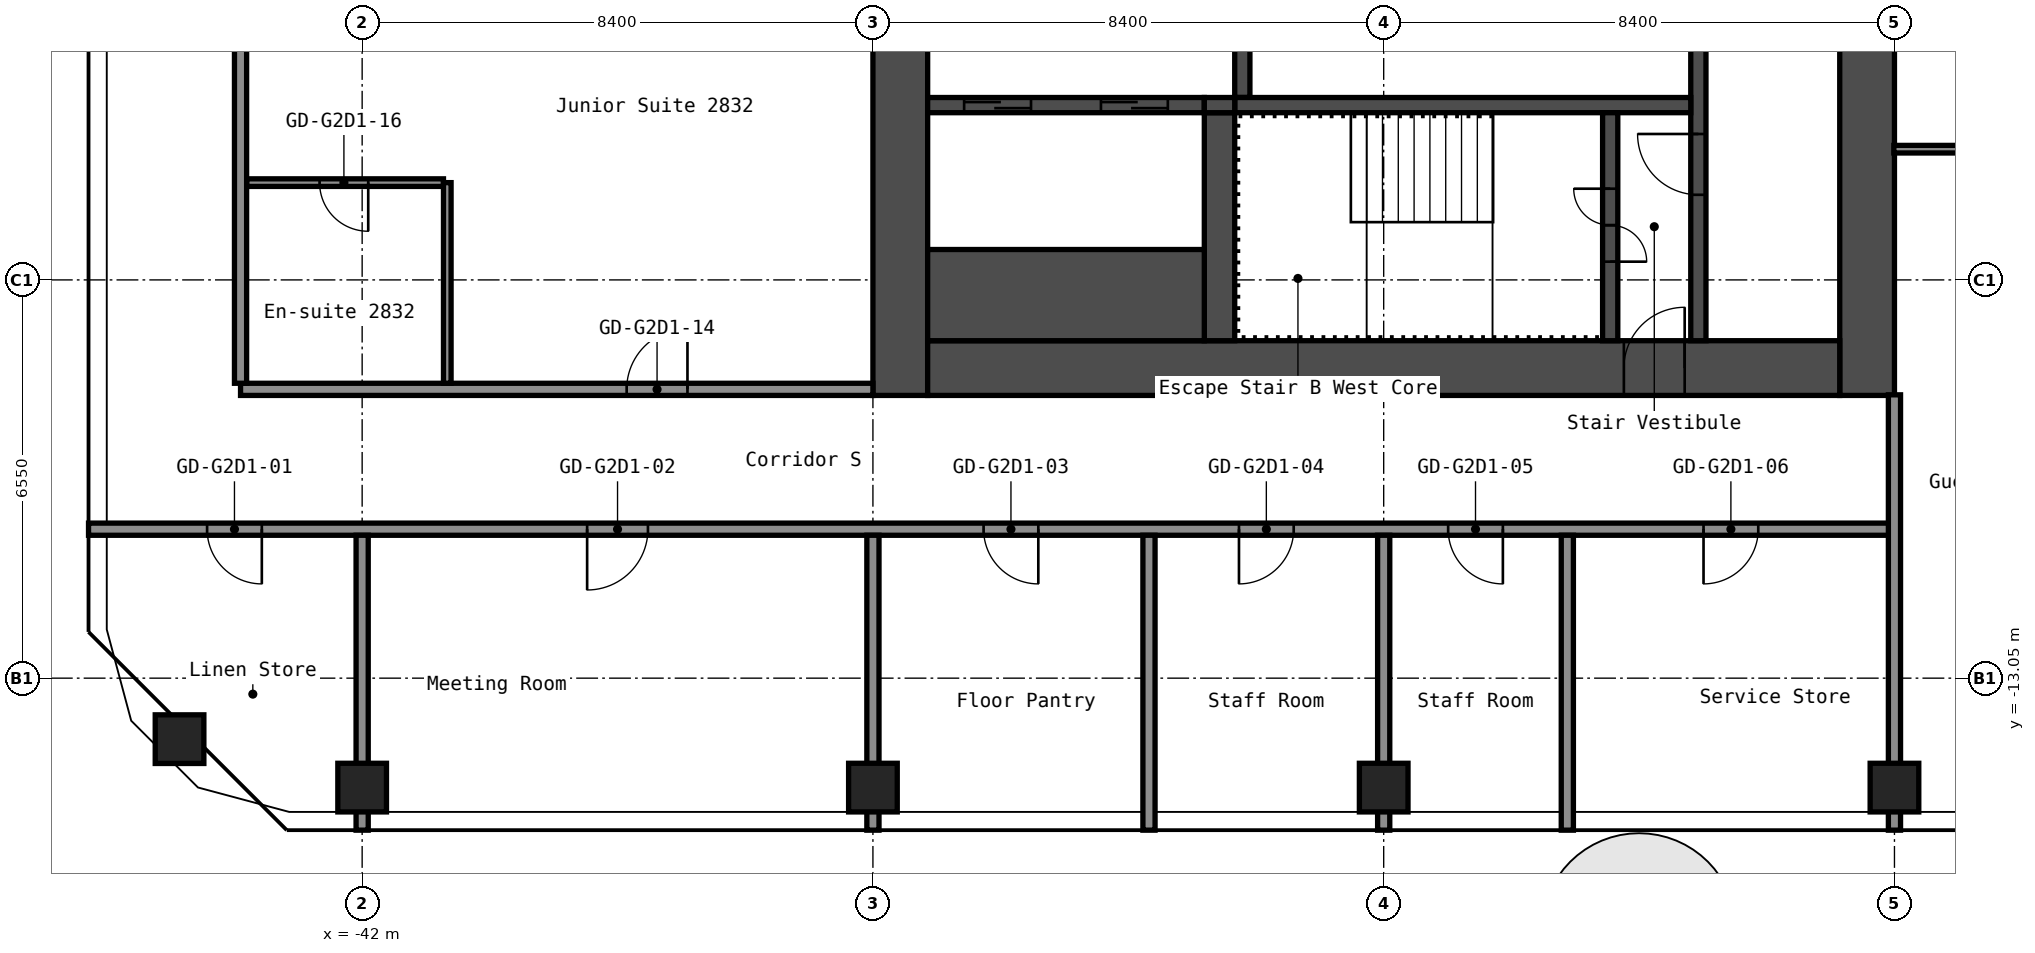
"""IFC4 building model, lengths in metres.
Left out: names, types, materials, properties, quantities, classifications, styles, units other than length and angle.
Written with IfcOpenShell. Run it as: python <this file> out.ifc"""

import sys

from ifc_helpers import new_model, si_unit, direction, frame, frame_2d, origin, origin_2d, place, context, subcontext, project, spatial, rectangle, hollow_rectangle, extrude, element, fill, save


model = new_model("IFC4")
c1 = context("Model", 3, precision=1e-05, world=origin(), true_north=direction((0.0, 1.0)))
c2 = subcontext(c1, "Body", "Model", "MODEL_VIEW")
j1 = project(units=[si_unit("LENGTHUNIT", "METRE"), si_unit("PLANEANGLEUNIT", "RADIAN")], contexts=[c1])
p1 = place(None, origin())
s1 = spatial("IfcSite", under=j1, at=p1, CompositionType="ELEMENT")
p2 = place(p1, origin())
s2 = spatial("IfcBuilding", under=s1, at=p2, CompositionType="ELEMENT")
p3 = place(p2, frame((0.0, 0.0, 101.0)))
s3 = spatial("IfcBuildingStorey", under=s2, at=p3, CompositionType="ELEMENT", Elevation=101.0)
for number, where, z_axis, x_axis in (
    (1, (-45.003, -14.053, 0.0), (0.0, 0.0, 1.0), (1.0, 0.0, 0.0)),
    (2, (-42.0, -14.85, 0.0), (0.0, 0.0, 1.0), (1.0, 0.0, 0.0)),
    (3, (-33.6, -14.85, 0.0), (0.0, 0.0, 1.0), (1.0, 0.0, 0.0)),
    (4, (-25.2, -14.85, 0.0), (0.0, 0.0, 1.0), (1.0, 0.0, 0.0)),
    (5, (-16.8, -14.85, 0.0), (0.0, 0.0, 1.0), (1.0, 0.0, 0.0)),
):
    element("IfcColumn", number, at=place(p3, frame(where, z_axis=z_axis, x_axis=x_axis)), inside=s3, PredefinedType="COLUMN", context=c2, shape_type="SweptSolid", body=[
        extrude(hollow_rectangle(XDim=0.8, YDim=0.8, WallThickness=0.032, at=origin_2d()), origin(), (0.0, 0.0, 1.0), 2.8),
    ])
p4 = place(p3, frame((-17.25, -8.4, 0.0), z_axis=(0.0, 0.0, 1.0), x_axis=(0.0, 1.0, 0.0)))
e6 = element("IfcWall", 6, at=p4, inside=s3, PredefinedType="SHEAR", context=c2, shape_type="SweptSolid", body=[
    extrude(rectangle(XDim=16.8, YDim=0.9, at=frame_2d((8.4, 0.0))), origin(), (0.0, 0.0, 1.0), 2.8),
])
p5 = place(p4, frame((7.6, 0.0, 0.0)))
e7 = element("IfcOpeningElement", 7, at=p5, cuts=e6, PredefinedType="OPENING", context=c2, shape_type="SweptSolid", body=[
    extrude(rectangle(XDim=1.2, YDim=2.1, at=frame_2d((0.6, 1.05))), frame((0.0, 0.46, 0.0), z_axis=(0.0, -1.0, 0.0), x_axis=(1.0, 0.0, 0.0)), (0.0, 0.0, 1.0), 0.92),
])
p6 = place(p3, frame((-33.15, -8.4, 0.0), z_axis=(0.0, 0.0, 1.0), x_axis=(0.0, 1.0, 0.0)))
e8 = element("IfcWall", 8, at=p6, inside=s3, PredefinedType="SHEAR", context=c2, shape_type="SweptSolid", body=[
    extrude(rectangle(XDim=16.8, YDim=0.9, at=frame_2d((8.4, 0.0))), origin(), (0.0, 0.0, 1.0), 2.8),
])
p7 = place(p3, frame((-32.7, -7.95, 0.0), z_axis=(0.0, 0.0, 1.0), x_axis=(1.0, 0.0, 0.0)))
e9 = element("IfcWall", 9, at=p7, inside=s3, PredefinedType="SHEAR", context=c2, shape_type="SweptSolid", body=[
    extrude(rectangle(XDim=15.0, YDim=0.9, at=frame_2d((7.5, 0.0))), origin(), (0.0, 0.0, 1.0), 2.8),
])
p8 = place(p7, frame((11.45, 0.0, 0.0)))
e10 = element("IfcOpeningElement", 10, at=p8, cuts=e9, PredefinedType="OPENING", context=c2, shape_type="SweptSolid", body=[
    extrude(rectangle(XDim=1.0, YDim=2.1, at=frame_2d((0.5, 1.05))), frame((0.0, 0.46, 0.0), z_axis=(0.0, -1.0, 0.0), x_axis=(1.0, 0.0, 0.0)), (0.0, 0.0, 1.0), 0.92),
])
p9 = place(p3, frame((-20.025, -7.5, 0.0), z_axis=(0.0, 0.0, 1.0), x_axis=(0.0, 1.0, 0.0)))
e11 = element("IfcWall", 11, at=p9, inside=s3, PredefinedType="SHEAR", context=c2, shape_type="SweptSolid", body=[
    extrude(rectangle(XDim=6.3, YDim=0.25, at=frame_2d((3.15, 0.0))), origin(), (0.0, 0.0, 1.0), 2.8),
])
p10 = place(p9, frame((2.4, 0.0, 0.0)))
e12 = element("IfcOpeningElement", 12, at=p10, cuts=e11, PredefinedType="OPENING", context=c2, shape_type="SweptSolid", body=[
    extrude(rectangle(XDim=1.0, YDim=2.1, at=frame_2d((0.5, 1.05))), frame((0.0, 0.135, 0.0), z_axis=(0.0, -1.0, 0.0), x_axis=(1.0, 0.0, 0.0)), (0.0, 0.0, 1.0), 0.27),
])
p11 = place(p3, frame((-27.525, -3.5, 0.0), z_axis=(0.0, 0.0, 1.0), x_axis=(0.0, 1.0, 0.0)))
e13 = element("IfcWall", 13, at=p11, inside=s3, PredefinedType="SHEAR", context=c2, shape_type="SweptSolid", body=[
    extrude(rectangle(XDim=2.05, YDim=0.25, at=frame_2d((1.025, 0.0))), origin(), (0.0, 0.0, 1.0), 2.8),
])
p12 = place(p3, frame((-27.65, -3.625, 0.0), z_axis=(0.0, 0.0, 1.0), x_axis=(1.0, 0.0, 0.0)))
e14 = element("IfcWall", 14, at=p12, inside=s3, PredefinedType="SHEAR", context=c2, shape_type="SweptSolid", body=[
    extrude(rectangle(XDim=7.5, YDim=0.25, at=frame_2d((3.75, 0.0))), origin(), (0.0, 0.0, 1.0), 2.8),
])
p13 = place(p3, frame((-21.475, -7.5, 0.0), z_axis=(0.0, 0.0, 1.0), x_axis=(0.0, 1.0, 0.0)))
e15 = element("IfcWall", 15, at=p13, inside=s3, PredefinedType="SHEAR", context=c2, shape_type="SweptSolid", body=[
    extrude(rectangle(XDim=3.75, YDim=0.25, at=frame_2d((1.875, 0.0))), origin(), (0.0, 0.0, 1.0), 2.8),
])
p14 = place(p13, frame((1.3, 0.0, 0.0)))
e16 = element("IfcOpeningElement", 16, at=p14, cuts=e15, PredefinedType="OPENING", context=c2, shape_type="SweptSolid", body=[
    extrude(rectangle(XDim=1.2, YDim=2.1, at=frame_2d((0.6, 1.05))), frame((0.0, 0.135, 0.0), z_axis=(0.0, -1.0, 0.0), x_axis=(1.0, 0.0, 0.0)), (0.0, 0.0, 1.0), 0.27),
])
p15 = place(p3, frame((-27.9, -7.5, 0.0), z_axis=(0.0, 0.0, 1.0), x_axis=(0.0, 1.0, 0.0)))
e17 = element("IfcWall", 17, at=p15, inside=s3, PredefinedType="SHEAR", context=c2, shape_type="SweptSolid", body=[
    extrude(rectangle(XDim=3.75, YDim=0.5, at=frame_2d((1.875, 0.0))), origin(), (0.0, 0.0, 1.0), 2.8),
])
p16 = place(p3, frame((-32.7, -3.625, 0.0), z_axis=(0.0, 0.0, 1.0), x_axis=(1.0, 0.0, 0.0)))
e18 = element("IfcWall", 18, at=p16, inside=s3, PredefinedType="SHEAR", context=c2, shape_type="SweptSolid", body=[
    extrude(rectangle(XDim=4.55, YDim=0.25, at=frame_2d((2.275, 0.0))), origin(), (0.0, 0.0, 1.0), 2.8),
])
p17 = place(p16, frame((2.85, 0.0, 0.0)))
e19 = element("IfcOpeningElement", 19, at=p17, cuts=e18, PredefinedType="OPENING", context=c2, shape_type="SweptSolid", body=[
    extrude(rectangle(XDim=1.1, YDim=2.1, at=frame_2d((0.55, 1.05))), frame((0.0, 0.135, 0.0), z_axis=(0.0, -1.0, 0.0), x_axis=(1.0, 0.0, 0.0)), (0.0, 0.0, 1.0), 0.27),
])
p18 = place(p16, frame((0.6, 0.0, 0.0)))
e20 = element("IfcOpeningElement", 20, at=p18, cuts=e18, PredefinedType="OPENING", context=c2, shape_type="SweptSolid", body=[
    extrude(rectangle(XDim=1.1, YDim=2.1, at=frame_2d((0.55, 1.05))), frame((0.0, 0.135, 0.0), z_axis=(0.0, -1.0, 0.0), x_axis=(1.0, 0.0, 0.0)), (0.0, 0.0, 1.0), 0.27),
])
p19 = place(p3, frame((-32.7, -6.75, 0.0), z_axis=(0.0, 0.0, 1.0), x_axis=(1.0, 0.0, 0.0)))
e21 = element("IfcWall", 21, at=p19, inside=s3, PredefinedType="SHEAR", context=c2, shape_type="SweptSolid", body=[
    extrude(rectangle(XDim=4.55, YDim=1.5, at=frame_2d((2.275, 0.0))), origin(), (0.0, 0.0, 1.0), 2.8),
])
p20 = place(p3, frame((-28.15, -3.625, 0.0), z_axis=(0.0, 0.0, 1.0), x_axis=(1.0, 0.0, 0.0)))
e22 = element("IfcWall", 22, at=p20, inside=s3, PredefinedType="SHEAR", context=c2, shape_type="SweptSolid", body=[
    extrude(rectangle(XDim=0.5, YDim=0.25, at=frame_2d((0.25, 0.0))), origin(), (0.0, 0.0, 1.0), 2.8),
])
p21 = place(p3, frame((-46.5, -10.6, 0.0), z_axis=(0.0, 0.0, 1.0), x_axis=(1.0, 0.0, 0.0)))
e23 = element("IfcWall", 23, at=p21, inside=s3, PredefinedType="PARTITIONING", context=c2, shape_type="SweptSolid", body=[
    extrude(rectangle(XDim=29.7, YDim=0.2, at=frame_2d((14.85, 0.0))), origin(), (0.0, 0.0, 1.0), 2.8),
])
p22 = place(p21, frame((1.95, 0.0, 0.0)))
e24 = element("IfcOpeningElement", 24, at=p22, cuts=e23, PredefinedType="OPENING", context=c2, shape_type="SweptSolid", body=[
    extrude(rectangle(XDim=0.9, YDim=2.1, at=frame_2d((0.45, 1.05))), frame((0.0, 0.11, 0.0), z_axis=(0.0, -1.0, 0.0), x_axis=(1.0, 0.0, 0.0)), (0.0, 0.0, 1.0), 0.22),
])
p23 = place(p21, frame((8.2, 0.0, 0.0)))
e25 = element("IfcOpeningElement", 25, at=p23, cuts=e23, PredefinedType="OPENING", context=c2, shape_type="SweptSolid", body=[
    extrude(rectangle(XDim=1.0, YDim=2.1, at=frame_2d((0.5, 1.05))), frame((0.0, 0.11, 0.0), z_axis=(0.0, -1.0, 0.0), x_axis=(1.0, 0.0, 0.0)), (0.0, 0.0, 1.0), 0.22),
])
p24 = place(p21, frame((14.72, 0.0, 0.0)))
e26 = element("IfcOpeningElement", 26, at=p24, cuts=e23, PredefinedType="OPENING", context=c2, shape_type="SweptSolid", body=[
    extrude(rectangle(XDim=0.9, YDim=2.1, at=frame_2d((0.45, 1.05))), frame((0.0, 0.11, 0.0), z_axis=(0.0, -1.0, 0.0), x_axis=(1.0, 0.0, 0.0)), (0.0, 0.0, 1.0), 0.22),
])
p25 = place(p21, frame((18.92, 0.0, 0.0)))
e27 = element("IfcOpeningElement", 27, at=p25, cuts=e23, PredefinedType="OPENING", context=c2, shape_type="SweptSolid", body=[
    extrude(rectangle(XDim=0.9, YDim=2.1, at=frame_2d((0.45, 1.05))), frame((0.0, 0.11, 0.0), z_axis=(0.0, -1.0, 0.0), x_axis=(1.0, 0.0, 0.0)), (0.0, 0.0, 1.0), 0.22),
])
p26 = place(p21, frame((22.36, 0.0, 0.0)))
e28 = element("IfcOpeningElement", 28, at=p26, cuts=e23, PredefinedType="OPENING", context=c2, shape_type="SweptSolid", body=[
    extrude(rectangle(XDim=0.9, YDim=2.1, at=frame_2d((0.45, 1.05))), frame((0.0, 0.11, 0.0), z_axis=(0.0, -1.0, 0.0), x_axis=(1.0, 0.0, 0.0)), (0.0, 0.0, 1.0), 0.22),
])
p27 = place(p21, frame((26.56, 0.0, 0.0)))
e29 = element("IfcOpeningElement", 29, at=p27, cuts=e23, PredefinedType="OPENING", context=c2, shape_type="SweptSolid", body=[
    extrude(rectangle(XDim=0.9, YDim=2.1, at=frame_2d((0.45, 1.05))), frame((0.0, 0.11, 0.0), z_axis=(0.0, -1.0, 0.0), x_axis=(1.0, 0.0, 0.0)), (0.0, 0.0, 1.0), 0.22),
])
p28 = place(p3, frame((-44.0, -8.3, 0.0), z_axis=(0.0, 0.0, 1.0), x_axis=(1.0, 0.0, 0.0)))
e30 = element("IfcWall", 30, at=p28, inside=s3, PredefinedType="PARTITIONING", context=c2, shape_type="SweptSolid", body=[
    extrude(rectangle(XDim=10.4, YDim=0.2, at=frame_2d((5.2, 0.0))), origin(), (0.0, 0.0, 1.0), 2.8),
])
p29 = place(p28, frame((6.35, 0.0, 0.0)))
e31 = element("IfcOpeningElement", 31, at=p29, cuts=e30, PredefinedType="OPENING", context=c2, shape_type="SweptSolid", body=[
    extrude(rectangle(XDim=1.0, YDim=2.1, at=frame_2d((0.5, 1.05))), frame((0.0, 0.11, 0.0), z_axis=(0.0, -1.0, 0.0), x_axis=(1.0, 0.0, 0.0)), (0.0, 0.0, 1.0), 0.22),
])
p30 = place(p3, frame((-43.9, -4.9, 0.0), z_axis=(0.0, 0.0, 1.0), x_axis=(1.0, 0.0, 0.0)))
e32 = element("IfcWall", 32, at=p30, inside=s3, PredefinedType="PARTITIONING", context=c2, shape_type="SweptSolid", body=[
    extrude(rectangle(XDim=3.237, YDim=0.125, at=frame_2d((1.619, 0.0))), origin(), (0.0, 0.0, 1.0), 2.8),
])
p31 = place(p30, frame((1.2, 0.0, 0.0)))
e33 = element("IfcOpeningElement", 33, at=p31, cuts=e32, PredefinedType="OPENING", context=c2, shape_type="SweptSolid", body=[
    extrude(rectangle(XDim=0.8, YDim=2.1, at=frame_2d((0.4, 1.05))), frame((0.0, 0.073, 0.0), z_axis=(0.0, -1.0, 0.0), x_axis=(1.0, 0.0, 0.0)), (0.0, 0.0, 1.0), 0.145),
])
p32 = place(p3, frame((-16.81, -4.35, 0.0), z_axis=(0.0, 0.0, 1.0), x_axis=(1.0, 0.0, 0.0)))
e34 = element("IfcWall", 34, at=p32, inside=s3, PredefinedType="PARTITIONING", context=c2, shape_type="SweptSolid", body=[
    extrude(rectangle(XDim=2.448, YDim=0.125, at=frame_2d((1.224, 0.0))), origin(), (0.0, 0.0, 1.0), 2.8),
])
p33 = place(p3, frame((-44.0, -8.2, 0.0), z_axis=(0.0, 0.0, 1.0), x_axis=(0.0, 1.0, 0.0)))
e35 = element("IfcWall", 35, at=p33, inside=s3, PredefinedType="PARTITIONING", context=c2, shape_type="SweptSolid", body=[
    extrude(rectangle(XDim=16.4, YDim=0.2, at=frame_2d((8.2, 0.0))), origin(), (0.0, 0.0, 1.0), 2.8),
])
p34 = place(p3, frame((-42.0, -15.55, 0.0), z_axis=(0.0, 0.0, 1.0), x_axis=(0.0, 1.0, 0.0)))
e36 = element("IfcWall", 36, at=p34, inside=s3, PredefinedType="PARTITIONING", context=c2, shape_type="SweptSolid", body=[
    extrude(rectangle(XDim=4.85, YDim=0.2, at=frame_2d((2.425, 0.0))), origin(), (0.0, 0.0, 1.0), 2.8),
])
p35 = place(p3, frame((-40.6, -8.2, 0.0), z_axis=(0.0, 0.0, 1.0), x_axis=(0.0, 1.0, 0.0)))
e37 = element("IfcWall", 37, at=p35, inside=s3, PredefinedType="PARTITIONING", context=c2, shape_type="SweptSolid", body=[
    extrude(rectangle(XDim=3.3, YDim=0.125, at=frame_2d((1.65, 0.0))), origin(), (0.0, 0.0, 1.0), 2.8),
])
for number, where, z_axis, x_axis in (
    (38, (-33.6, -15.55, 0.0), (0.0, 0.0, 1.0), (0.0, 1.0, 0.0)),
    (39, (-29.06, -15.55, 0.0), (0.0, 0.0, 1.0), (0.0, 1.0, 0.0)),
    (40, (-25.2, -15.55, 0.0), (0.0, 0.0, 1.0), (0.0, 1.0, 0.0)),
    (41, (-22.18, -15.55, 0.0), (0.0, 0.0, 1.0), (0.0, 1.0, 0.0)),
):
    element("IfcWall", number, at=place(p3, frame(where, z_axis=z_axis, x_axis=x_axis)), inside=s3, PredefinedType="PARTITIONING", context=c2, shape_type="SweptSolid", body=[
        extrude(rectangle(XDim=4.85, YDim=0.2, at=frame_2d((2.425, 0.0))), origin(), (0.0, 0.0, 1.0), 2.8),
    ])
p36 = place(p3, frame((-16.8, -15.55, 0.0), z_axis=(0.0, 0.0, 1.0), x_axis=(0.0, 1.0, 0.0)))
e42 = element("IfcWall", 42, at=p36, inside=s3, PredefinedType="PARTITIONING", context=c2, shape_type="SweptSolid", body=[
    extrude(rectangle(XDim=7.16, YDim=0.2, at=frame_2d((3.58, 0.0))), origin(), (0.0, 0.0, 1.0), 2.8),
])
p37 = place(p8, origin())
e43 = element("IfcDoor", 43, at=p37, inside=s3, OperationType="SINGLE_SWING_LEFT", PredefinedType="DOOR", context=c2, shape_type="SweptSolid", body=[
    extrude(rectangle(XDim=1.0, YDim=2.1, at=frame_2d((0.5, 1.05))), frame((0.0, 0.025, 0.0), z_axis=(0.0, -1.0, 0.0), x_axis=(1.0, 0.0, 0.0)), (0.0, 0.0, 1.0), 0.05),
])
fill(e10, e43)
p38 = place(p14, origin())
e44 = element("IfcDoor", 44, at=p38, inside=s3, OperationType="DOUBLE_DOOR_SINGLE_SWING", PredefinedType="DOOR", context=c2, shape_type="SweptSolid", body=[
    extrude(rectangle(XDim=1.2, YDim=2.1, at=frame_2d((0.6, 1.05))), frame((0.0, 0.025, 0.0), z_axis=(0.0, -1.0, 0.0), x_axis=(1.0, 0.0, 0.0)), (0.0, 0.0, 1.0), 0.05),
])
fill(e16, e44)
p39 = place(p10, origin())
e45 = element("IfcDoor", 45, at=p39, inside=s3, OperationType="SINGLE_SWING_LEFT", PredefinedType="DOOR", context=c2, shape_type="SweptSolid", body=[
    extrude(rectangle(XDim=1.0, YDim=2.1, at=frame_2d((0.5, 1.05))), frame((0.0, 0.025, 0.0), z_axis=(0.0, -1.0, 0.0), x_axis=(1.0, 0.0, 0.0)), (0.0, 0.0, 1.0), 0.05),
])
fill(e12, e45)
p40 = place(p17, origin())
e46 = element("IfcDoor", 46, at=p40, inside=s3, OperationType="DOUBLE_DOOR_SLIDING", PredefinedType="DOOR", context=c2, shape_type="SweptSolid", body=[
    extrude(rectangle(XDim=1.1, YDim=2.1, at=frame_2d((0.55, 1.05))), frame((0.0, 0.025, 0.0), z_axis=(0.0, -1.0, 0.0), x_axis=(1.0, 0.0, 0.0)), (0.0, 0.0, 1.0), 0.05),
])
fill(e19, e46)
p41 = place(p18, origin())
e47 = element("IfcDoor", 47, at=p41, inside=s3, OperationType="DOUBLE_DOOR_SLIDING", PredefinedType="DOOR", context=c2, shape_type="SweptSolid", body=[
    extrude(rectangle(XDim=1.1, YDim=2.1, at=frame_2d((0.55, 1.05))), frame((0.0, 0.025, 0.0), z_axis=(0.0, -1.0, 0.0), x_axis=(1.0, 0.0, 0.0)), (0.0, 0.0, 1.0), 0.05),
])
fill(e20, e47)
p42 = place(p22, origin())
e48 = element("IfcDoor", 48, at=p42, inside=s3, OperationType="SINGLE_SWING_RIGHT", PredefinedType="DOOR", context=c2, shape_type="SweptSolid", body=[
    extrude(rectangle(XDim=0.9, YDim=2.1, at=frame_2d((0.45, 1.05))), frame((0.0, 0.025, 0.0), z_axis=(0.0, -1.0, 0.0), x_axis=(1.0, 0.0, 0.0)), (0.0, 0.0, 1.0), 0.05),
])
fill(e24, e48)
p43 = place(p23, origin())
e49 = element("IfcDoor", 49, at=p43, inside=s3, OperationType="SINGLE_SWING_LEFT", PredefinedType="DOOR", context=c2, shape_type="SweptSolid", body=[
    extrude(rectangle(XDim=1.0, YDim=2.1, at=frame_2d((0.5, 1.05))), frame((0.0, 0.025, 0.0), z_axis=(0.0, -1.0, 0.0), x_axis=(1.0, 0.0, 0.0)), (0.0, 0.0, 1.0), 0.05),
])
fill(e25, e49)
p44 = place(p24, origin())
e50 = element("IfcDoor", 50, at=p44, inside=s3, OperationType="SINGLE_SWING_RIGHT", PredefinedType="DOOR", context=c2, shape_type="SweptSolid", body=[
    extrude(rectangle(XDim=0.9, YDim=2.1, at=frame_2d((0.45, 1.05))), frame((0.0, 0.025, 0.0), z_axis=(0.0, -1.0, 0.0), x_axis=(1.0, 0.0, 0.0)), (0.0, 0.0, 1.0), 0.05),
])
fill(e26, e50)
p45 = place(p25, origin())
e51 = element("IfcDoor", 51, at=p45, inside=s3, OperationType="SINGLE_SWING_LEFT", PredefinedType="DOOR", context=c2, shape_type="SweptSolid", body=[
    extrude(rectangle(XDim=0.9, YDim=2.1, at=frame_2d((0.45, 1.05))), frame((0.0, 0.025, 0.0), z_axis=(0.0, -1.0, 0.0), x_axis=(1.0, 0.0, 0.0)), (0.0, 0.0, 1.0), 0.05),
])
fill(e27, e51)
p46 = place(p26, origin())
e52 = element("IfcDoor", 52, at=p46, inside=s3, OperationType="SINGLE_SWING_RIGHT", PredefinedType="DOOR", context=c2, shape_type="SweptSolid", body=[
    extrude(rectangle(XDim=0.9, YDim=2.1, at=frame_2d((0.45, 1.05))), frame((0.0, 0.025, 0.0), z_axis=(0.0, -1.0, 0.0), x_axis=(1.0, 0.0, 0.0)), (0.0, 0.0, 1.0), 0.05),
])
fill(e28, e52)
p47 = place(p27, origin())
e53 = element("IfcDoor", 53, at=p47, inside=s3, OperationType="SINGLE_SWING_LEFT", PredefinedType="DOOR", context=c2, shape_type="SweptSolid", body=[
    extrude(rectangle(XDim=0.9, YDim=2.1, at=frame_2d((0.45, 1.05))), frame((0.0, 0.025, 0.0), z_axis=(0.0, -1.0, 0.0), x_axis=(1.0, 0.0, 0.0)), (0.0, 0.0, 1.0), 0.05),
])
fill(e29, e53)
p48 = place(p29, origin())
e54 = element("IfcDoor", 54, at=p48, inside=s3, OperationType="SINGLE_SWING_LEFT", PredefinedType="DOOR", context=c2, shape_type="SweptSolid", body=[
    extrude(rectangle(XDim=1.0, YDim=2.1, at=frame_2d((0.5, 1.05))), frame((0.0, 0.025, 0.0), z_axis=(0.0, -1.0, 0.0), x_axis=(1.0, 0.0, 0.0)), (0.0, 0.0, 1.0), 0.05),
])
fill(e31, e54)
p49 = place(p31, origin())
e55 = element("IfcDoor", 55, at=p49, inside=s3, OperationType="SINGLE_SWING_RIGHT", PredefinedType="DOOR", context=c2, shape_type="SweptSolid", body=[
    extrude(rectangle(XDim=0.8, YDim=2.1, at=frame_2d((0.4, 1.05))), frame((0.0, 0.025, 0.0), z_axis=(0.0, -1.0, 0.0), x_axis=(1.0, 0.0, 0.0)), (0.0, 0.0, 1.0), 0.05),
])
fill(e33, e55)
save(model, sys.argv[1])
